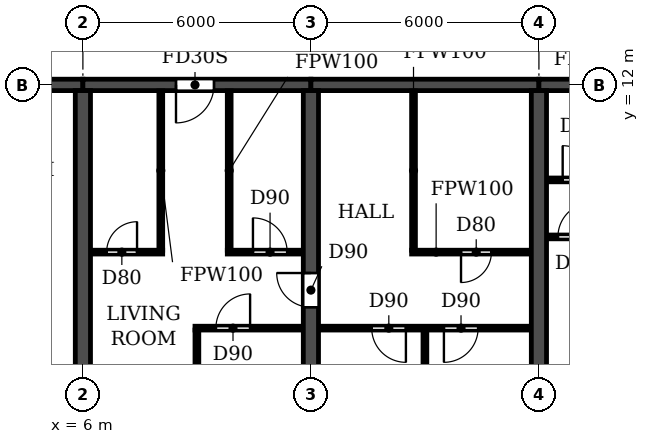
"""IFC4 building model, lengths in metres.
Left out: names, types, materials, properties, quantities, classifications, styles, units other than length and angle.
Written with IfcOpenShell. Run it as: python <this file> out.ifc"""

import sys

from ifc_helpers import new_model, si_unit, direction, frame, frame_2d, origin, place, context, subcontext, project, spatial, rectangle, extrude, element, fill, save


model = new_model("IFC4")
c1 = context("Model", 3, precision=1e-05, world=origin(), true_north=direction((0.0, 1.0)))
c2 = subcontext(c1, "Body", "Model", "MODEL_VIEW")
j1 = project(units=[si_unit("LENGTHUNIT", "METRE"), si_unit("PLANEANGLEUNIT", "RADIAN")], contexts=[c1])
p1 = place(None, origin())
s1 = spatial("IfcSite", under=j1, at=p1, CompositionType="ELEMENT")
p2 = place(p1, origin())
s2 = spatial("IfcBuilding", under=s1, at=p2, CompositionType="ELEMENT")
p3 = place(p2, frame((0.0, 0.0, 23.4)))
s3 = spatial("IfcBuildingStorey", under=s2, at=p3, CompositionType="ELEMENT", Elevation=23.4)
p4 = place(p3, frame((6.0, 0.2, 0.0), z_axis=(0.0, 0.0, 1.0), x_axis=(0.0, 1.0, 0.0)))
e1 = element("IfcWall", 1, at=p4, inside=s3, PredefinedType="SHEAR", context=c2, shape_type="SweptSolid", body=[
    extrude(rectangle(XDim=11.65, YDim=0.4, at=frame_2d((5.825, 0.0))), origin(), (0.0, 0.0, 1.0), 3.05),
])
p5 = place(p3, frame((12.0, 0.2, 0.0), z_axis=(0.0, 0.0, 1.0), x_axis=(0.0, 1.0, 0.0)))
e2 = element("IfcWall", 2, at=p5, inside=s3, PredefinedType="SHEAR", context=c2, shape_type="SweptSolid", body=[
    extrude(rectangle(XDim=11.65, YDim=0.4, at=frame_2d((5.825, 0.0))), origin(), (0.0, 0.0, 1.0), 3.05),
])
p6 = place(p5, frame((5.95, 0.0, 0.0)))
e3 = element("IfcOpeningElement", 3, at=p6, cuts=e2, PredefinedType="OPENING", context=c2, shape_type="SweptSolid", body=[
    extrude(rectangle(XDim=0.9, YDim=2.1, at=frame_2d((0.45, 1.05))), frame((0.0, 0.21, 0.0), z_axis=(0.0, -1.0, 0.0), x_axis=(1.0, 0.0, 0.0)), (0.0, 0.0, 1.0), 0.42),
])
p7 = place(p3, frame((18.0, 0.2, 0.0), z_axis=(0.0, 0.0, 1.0), x_axis=(0.0, 1.0, 0.0)))
e4 = element("IfcWall", 4, at=p7, inside=s3, PredefinedType="SHEAR", context=c2, shape_type="SweptSolid", body=[
    extrude(rectangle(XDim=11.65, YDim=0.4, at=frame_2d((5.825, 0.0))), origin(), (0.0, 0.0, 1.0), 3.05),
])
p8 = place(p3, frame((0.2, 12.0, 0.0), z_axis=(0.0, 0.0, 1.0), x_axis=(1.0, 0.0, 0.0)))
e5 = element("IfcWall", 5, at=p8, inside=s3, PredefinedType="SHEAR", context=c2, shape_type="SweptSolid", body=[
    extrude(rectangle(XDim=5.8, YDim=0.3, at=frame_2d((2.9, 0.0))), origin(), (0.0, 0.0, 1.0), 2.45),
])
p9 = place(p8, frame((2.3, 0.0, 0.0)))
e6 = element("IfcOpeningElement", 6, at=p9, cuts=e5, PredefinedType="OPENING", context=c2, shape_type="SweptSolid", body=[
    extrude(rectangle(XDim=1.0, YDim=2.1, at=frame_2d((0.5, 1.05))), frame((0.0, 0.16, 0.0), z_axis=(0.0, -1.0, 0.0), x_axis=(1.0, 0.0, 0.0)), (0.0, 0.0, 1.0), 0.32),
])
p10 = place(p3, frame((6.0, 12.0, 0.0), z_axis=(0.0, 0.0, 1.0), x_axis=(1.0, 0.0, 0.0)))
e7 = element("IfcWall", 7, at=p10, inside=s3, PredefinedType="SHEAR", context=c2, shape_type="SweptSolid", body=[
    extrude(rectangle(XDim=6.0, YDim=0.3, at=frame_2d((3.0, 0.0))), origin(), (0.0, 0.0, 1.0), 2.45),
])
p11 = place(p10, frame((2.45, 0.0, 0.0)))
e8 = element("IfcOpeningElement", 8, at=p11, cuts=e7, PredefinedType="OPENING", context=c2, shape_type="SweptSolid", body=[
    extrude(rectangle(XDim=1.0, YDim=2.1, at=frame_2d((0.5, 1.05))), frame((0.0, 0.16, 0.0), z_axis=(0.0, -1.0, 0.0), x_axis=(1.0, 0.0, 0.0)), (0.0, 0.0, 1.0), 0.32),
])
p12 = place(p3, frame((12.0, 12.0, 0.0), z_axis=(0.0, 0.0, 1.0), x_axis=(1.0, 0.0, 0.0)))
e9 = element("IfcWall", 9, at=p12, inside=s3, PredefinedType="SHEAR", context=c2, shape_type="SweptSolid", body=[
    extrude(rectangle(XDim=6.0, YDim=0.3, at=frame_2d((3.0, 0.0))), origin(), (0.0, 0.0, 1.0), 2.45),
])
p13 = place(p3, frame((18.0, 12.0, 0.0), z_axis=(0.0, 0.0, 1.0), x_axis=(1.0, 0.0, 0.0)))
e10 = element("IfcWall", 10, at=p13, inside=s3, PredefinedType="SHEAR", context=c2, shape_type="SweptSolid", body=[
    extrude(rectangle(XDim=6.0, YDim=0.3, at=frame_2d((3.0, 0.0))), origin(), (0.0, 0.0, 1.0), 2.45),
])
p14 = place(p13, frame((2.55, 0.0, 0.0)))
e11 = element("IfcOpeningElement", 11, at=p14, cuts=e10, PredefinedType="OPENING", context=c2, shape_type="SweptSolid", body=[
    extrude(rectangle(XDim=1.0, YDim=2.1, at=frame_2d((0.5, 1.05))), frame((0.0, 0.16, 0.0), z_axis=(0.0, -1.0, 0.0), x_axis=(1.0, 0.0, 0.0)), (0.0, 0.0, 1.0), 0.32),
])
p15 = place(p3, frame((8.95, 5.6, 0.0), z_axis=(0.0, 0.0, 1.0), x_axis=(1.0, 0.0, 0.0)))
e12 = element("IfcWall", 12, at=p15, inside=s3, PredefinedType="PARTITIONING", context=c2, shape_type="SweptSolid", body=[
    extrude(rectangle(XDim=2.84, YDim=0.1, at=frame_2d((1.42, 0.0))), origin(), (0.0, 0.0, 1.0), 3.05),
])
p16 = place(p15, frame((0.55, 0.0, 0.0)))
e13 = element("IfcOpeningElement", 13, at=p16, cuts=e12, PredefinedType="OPENING", context=c2, shape_type="SweptSolid", body=[
    extrude(rectangle(XDim=0.9, YDim=2.1, at=frame_2d((0.45, 1.05))), frame((0.0, 0.06, 0.0), z_axis=(0.0, -1.0, 0.0), x_axis=(1.0, 0.0, 0.0)), (0.0, 0.0, 1.0), 0.12),
])
p17 = place(p3, frame((12.21, 5.6, 0.0), z_axis=(0.0, 0.0, 1.0), x_axis=(1.0, 0.0, 0.0)))
e14 = element("IfcWall", 14, at=p17, inside=s3, PredefinedType="PARTITIONING", context=c2, shape_type="SweptSolid", body=[
    extrude(rectangle(XDim=5.58, YDim=0.1, at=frame_2d((2.79, 0.0))), origin(), (0.0, 0.0, 1.0), 3.05),
])
p18 = place(p17, frame((1.39, 0.0, 0.0)))
e15 = element("IfcOpeningElement", 15, at=p18, cuts=e14, PredefinedType="OPENING", context=c2, shape_type="SweptSolid", body=[
    extrude(rectangle(XDim=0.9, YDim=2.1, at=frame_2d((0.45, 1.05))), frame((0.0, 0.06, 0.0), z_axis=(0.0, -1.0, 0.0), x_axis=(1.0, 0.0, 0.0)), (0.0, 0.0, 1.0), 0.12),
])
p19 = place(p17, frame((3.29, 0.0, 0.0)))
e16 = element("IfcOpeningElement", 16, at=p19, cuts=e14, PredefinedType="OPENING", context=c2, shape_type="SweptSolid", body=[
    extrude(rectangle(XDim=0.9, YDim=2.1, at=frame_2d((0.45, 1.05))), frame((0.0, 0.06, 0.0), z_axis=(0.0, -1.0, 0.0), x_axis=(1.0, 0.0, 0.0)), (0.0, 0.0, 1.0), 0.12),
])
p20 = place(p3, frame((6.21, 7.6, 0.0), z_axis=(0.0, 0.0, 1.0), x_axis=(1.0, 0.0, 0.0)))
e17 = element("IfcWall", 17, at=p20, inside=s3, PredefinedType="PARTITIONING", context=c2, shape_type="SweptSolid", body=[
    extrude(rectangle(XDim=1.89, YDim=0.1, at=frame_2d((0.945, 0.0))), origin(), (0.0, 0.0, 1.0), 3.05),
])
p21 = place(p20, frame((0.415, 0.0, 0.0)))
e18 = element("IfcOpeningElement", 18, at=p21, cuts=e17, PredefinedType="OPENING", context=c2, shape_type="SweptSolid", body=[
    extrude(rectangle(XDim=0.8, YDim=2.1, at=frame_2d((0.4, 1.05))), frame((0.0, 0.06, 0.0), z_axis=(0.0, -1.0, 0.0), x_axis=(1.0, 0.0, 0.0)), (0.0, 0.0, 1.0), 0.12),
])
p22 = place(p3, frame((9.8, 7.6, 0.0), z_axis=(0.0, 0.0, 1.0), x_axis=(1.0, 0.0, 0.0)))
e19 = element("IfcWall", 19, at=p22, inside=s3, PredefinedType="PARTITIONING", context=c2, shape_type="SweptSolid", body=[
    extrude(rectangle(XDim=1.99, YDim=0.1, at=frame_2d((0.995, 0.0))), origin(), (0.0, 0.0, 1.0), 3.05),
])
p23 = place(p22, frame((0.675, 0.0, 0.0)))
e20 = element("IfcOpeningElement", 20, at=p23, cuts=e19, PredefinedType="OPENING", context=c2, shape_type="SweptSolid", body=[
    extrude(rectangle(XDim=0.9, YDim=2.1, at=frame_2d((0.45, 1.05))), frame((0.0, 0.06, 0.0), z_axis=(0.0, -1.0, 0.0), x_axis=(1.0, 0.0, 0.0)), (0.0, 0.0, 1.0), 0.12),
])
p24 = place(p3, frame((14.65, 7.6, 0.0), z_axis=(0.0, 0.0, 1.0), x_axis=(1.0, 0.0, 0.0)))
e21 = element("IfcWall", 21, at=p24, inside=s3, PredefinedType="PARTITIONING", context=c2, shape_type="SweptSolid", body=[
    extrude(rectangle(XDim=3.14, YDim=0.1, at=frame_2d((1.57, 0.0))), origin(), (0.0, 0.0, 1.0), 3.05),
])
p25 = place(p24, frame((1.3, 0.0, 0.0)))
e22 = element("IfcOpeningElement", 22, at=p25, cuts=e21, PredefinedType="OPENING", context=c2, shape_type="SweptSolid", body=[
    extrude(rectangle(XDim=0.8, YDim=2.1, at=frame_2d((0.4, 1.05))), frame((0.0, 0.06, 0.0), z_axis=(0.0, -1.0, 0.0), x_axis=(1.0, 0.0, 0.0)), (0.0, 0.0, 1.0), 0.12),
])
p26 = place(p3, frame((18.21, 8.0, 0.0), z_axis=(0.0, 0.0, 1.0), x_axis=(1.0, 0.0, 0.0)))
e23 = element("IfcWall", 23, at=p26, inside=s3, PredefinedType="PARTITIONING", context=c2, shape_type="SweptSolid", body=[
    extrude(rectangle(XDim=2.84, YDim=0.1, at=frame_2d((1.42, 0.0))), origin(), (0.0, 0.0, 1.0), 3.05),
])
p27 = place(p26, frame((0.29, 0.0, 0.0)))
e24 = element("IfcOpeningElement", 24, at=p27, cuts=e23, PredefinedType="OPENING", context=c2, shape_type="SweptSolid", body=[
    extrude(rectangle(XDim=0.9, YDim=2.1, at=frame_2d((0.45, 1.05))), frame((0.0, 0.06, 0.0), z_axis=(0.0, -1.0, 0.0), x_axis=(1.0, 0.0, 0.0)), (0.0, 0.0, 1.0), 0.12),
])
p28 = place(p3, frame((18.21, 9.5, 0.0), z_axis=(0.0, 0.0, 1.0), x_axis=(1.0, 0.0, 0.0)))
e25 = element("IfcWall", 25, at=p28, inside=s3, PredefinedType="PARTITIONING", context=c2, shape_type="SweptSolid", body=[
    extrude(rectangle(XDim=1.99, YDim=0.1, at=frame_2d((0.995, 0.0))), origin(), (0.0, 0.0, 1.0), 3.05),
])
p29 = place(p28, frame((0.415, 0.0, 0.0)))
e26 = element("IfcOpeningElement", 26, at=p29, cuts=e25, PredefinedType="OPENING", context=c2, shape_type="SweptSolid", body=[
    extrude(rectangle(XDim=0.9, YDim=2.1, at=frame_2d((0.45, 1.05))), frame((0.0, 0.06, 0.0), z_axis=(0.0, -1.0, 0.0), x_axis=(1.0, 0.0, 0.0)), (0.0, 0.0, 1.0), 0.12),
])
p30 = place(p3, frame((8.05, 7.65, 0.0), z_axis=(0.0, 0.0, 1.0), x_axis=(0.0, 1.0, 0.0)))
e27 = element("IfcWall", 27, at=p30, inside=s3, PredefinedType="PARTITIONING", context=c2, shape_type="SweptSolid", body=[
    extrude(rectangle(XDim=4.19, YDim=0.1, at=frame_2d((2.095, 0.0))), origin(), (0.0, 0.0, 1.0), 3.05),
])
p31 = place(p3, frame((9.0, 0.06, 0.0), z_axis=(0.0, 0.0, 1.0), x_axis=(0.0, 1.0, 0.0)))
e28 = element("IfcWall", 28, at=p31, inside=s3, PredefinedType="PARTITIONING", context=c2, shape_type="SweptSolid", body=[
    extrude(rectangle(XDim=5.49, YDim=0.1, at=frame_2d((2.745, 0.0))), origin(), (0.0, 0.0, 1.0), 3.05),
])
for number, where, z_axis, x_axis in (
    (29, (9.85, 7.65, 0.0), (0.0, 0.0, 1.0), (0.0, 1.0, 0.0)),
    (30, (14.7, 7.65, 0.0), (0.0, 0.0, 1.0), (0.0, 1.0, 0.0)),
):
    element("IfcWall", number, at=place(p3, frame(where, z_axis=z_axis, x_axis=x_axis)), inside=s3, PredefinedType="PARTITIONING", context=c2, shape_type="SweptSolid", body=[
        extrude(rectangle(XDim=4.19, YDim=0.1, at=frame_2d((2.095, 0.0))), origin(), (0.0, 0.0, 1.0), 3.05),
    ])
p32 = place(p3, frame((15.0, 0.06, 0.0), z_axis=(0.0, 0.0, 1.0), x_axis=(0.0, 1.0, 0.0)))
e31 = element("IfcWall", 31, at=p32, inside=s3, PredefinedType="PARTITIONING", context=c2, shape_type="SweptSolid", body=[
    extrude(rectangle(XDim=5.49, YDim=0.1, at=frame_2d((2.745, 0.0))), origin(), (0.0, 0.0, 1.0), 3.05),
])
p33 = place(p18, frame((0.9, 0.0, 0.0), z_axis=(0.0, 0.0, 1.0), x_axis=(-1.0, 0.0, 0.0)))
e32 = element("IfcDoor", 32, at=p33, inside=s3, OperationType="SINGLE_SWING_LEFT", PredefinedType="DOOR", context=c2, shape_type="SweptSolid", body=[
    extrude(rectangle(XDim=0.9, YDim=2.1, at=frame_2d((0.45, 1.05))), frame((0.0, 0.025, 0.0), z_axis=(0.0, -1.0, 0.0), x_axis=(1.0, 0.0, 0.0)), (0.0, 0.0, 1.0), 0.05),
])
fill(e15, e32)
p34 = place(p19, frame((0.9, 0.0, 0.0), z_axis=(0.0, 0.0, 1.0), x_axis=(-1.0, 0.0, 0.0)))
e33 = element("IfcDoor", 33, at=p34, inside=s3, OperationType="SINGLE_SWING_RIGHT", PredefinedType="DOOR", context=c2, shape_type="SweptSolid", body=[
    extrude(rectangle(XDim=0.9, YDim=2.1, at=frame_2d((0.45, 1.05))), frame((0.0, 0.025, 0.0), z_axis=(0.0, -1.0, 0.0), x_axis=(1.0, 0.0, 0.0)), (0.0, 0.0, 1.0), 0.05),
])
fill(e16, e33)
p35 = place(p25, frame((0.8, 0.0, 0.0), z_axis=(0.0, 0.0, 1.0), x_axis=(-1.0, 0.0, 0.0)))
e34 = element("IfcDoor", 34, at=p35, inside=s3, OperationType="SINGLE_SWING_RIGHT", PredefinedType="DOOR", context=c2, shape_type="SweptSolid", body=[
    extrude(rectangle(XDim=0.8, YDim=2.1, at=frame_2d((0.4, 1.05))), frame((0.0, 0.025, 0.0), z_axis=(0.0, -1.0, 0.0), x_axis=(1.0, 0.0, 0.0)), (0.0, 0.0, 1.0), 0.05),
])
fill(e22, e34)
p36 = place(p21, origin())
e35 = element("IfcDoor", 35, at=p36, inside=s3, OperationType="SINGLE_SWING_RIGHT", PredefinedType="DOOR", context=c2, shape_type="SweptSolid", body=[
    extrude(rectangle(XDim=0.8, YDim=2.1, at=frame_2d((0.4, 1.05))), frame((0.0, 0.025, 0.0), z_axis=(0.0, -1.0, 0.0), x_axis=(1.0, 0.0, 0.0)), (0.0, 0.0, 1.0), 0.05),
])
fill(e18, e35)
p37 = place(p11, frame((1.0, 0.0, 0.0), z_axis=(0.0, 0.0, 1.0), x_axis=(-1.0, 0.0, 0.0)))
e36 = element("IfcDoor", 36, at=p37, inside=s3, OperationType="SINGLE_SWING_RIGHT", PredefinedType="DOOR", context=c2, shape_type="SweptSolid", body=[
    extrude(rectangle(XDim=1.0, YDim=2.1, at=frame_2d((0.5, 1.05))), frame((0.0, 0.025, 0.0), z_axis=(0.0, -1.0, 0.0), x_axis=(1.0, 0.0, 0.0)), (0.0, 0.0, 1.0), 0.05),
])
fill(e8, e36)
p38 = place(p16, origin())
e37 = element("IfcDoor", 37, at=p38, inside=s3, OperationType="SINGLE_SWING_RIGHT", PredefinedType="DOOR", context=c2, shape_type="SweptSolid", body=[
    extrude(rectangle(XDim=0.9, YDim=2.1, at=frame_2d((0.45, 1.05))), frame((0.0, 0.025, 0.0), z_axis=(0.0, -1.0, 0.0), x_axis=(1.0, 0.0, 0.0)), (0.0, 0.0, 1.0), 0.05),
])
fill(e13, e37)
p39 = place(p23, origin())
e38 = element("IfcDoor", 38, at=p39, inside=s3, OperationType="SINGLE_SWING_LEFT", PredefinedType="DOOR", context=c2, shape_type="SweptSolid", body=[
    extrude(rectangle(XDim=0.9, YDim=2.1, at=frame_2d((0.45, 1.05))), frame((0.0, 0.025, 0.0), z_axis=(0.0, -1.0, 0.0), x_axis=(1.0, 0.0, 0.0)), (0.0, 0.0, 1.0), 0.05),
])
fill(e20, e38)
p40 = place(p6, origin())
e39 = element("IfcDoor", 39, at=p40, inside=s3, OperationType="SINGLE_SWING_RIGHT", PredefinedType="DOOR", context=c2, shape_type="SweptSolid", body=[
    extrude(rectangle(XDim=0.9, YDim=2.1, at=frame_2d((0.45, 1.05))), frame((0.0, 0.025, 0.0), z_axis=(0.0, -1.0, 0.0), x_axis=(1.0, 0.0, 0.0)), (0.0, 0.0, 1.0), 0.05),
])
fill(e3, e39)
p41 = place(p27, origin())
e40 = element("IfcDoor", 40, at=p41, inside=s3, OperationType="SINGLE_SWING_RIGHT", PredefinedType="DOOR", context=c2, shape_type="SweptSolid", body=[
    extrude(rectangle(XDim=0.9, YDim=2.1, at=frame_2d((0.45, 1.05))), frame((0.0, 0.025, 0.0), z_axis=(0.0, -1.0, 0.0), x_axis=(1.0, 0.0, 0.0)), (0.0, 0.0, 1.0), 0.05),
])
fill(e24, e40)
p42 = place(p29, origin())
e41 = element("IfcDoor", 41, at=p42, inside=s3, OperationType="SINGLE_SWING_LEFT", PredefinedType="DOOR", context=c2, shape_type="SweptSolid", body=[
    extrude(rectangle(XDim=0.9, YDim=2.1, at=frame_2d((0.45, 1.05))), frame((0.0, 0.025, 0.0), z_axis=(0.0, -1.0, 0.0), x_axis=(1.0, 0.0, 0.0)), (0.0, 0.0, 1.0), 0.05),
])
fill(e26, e41)
save(model, sys.argv[1])
